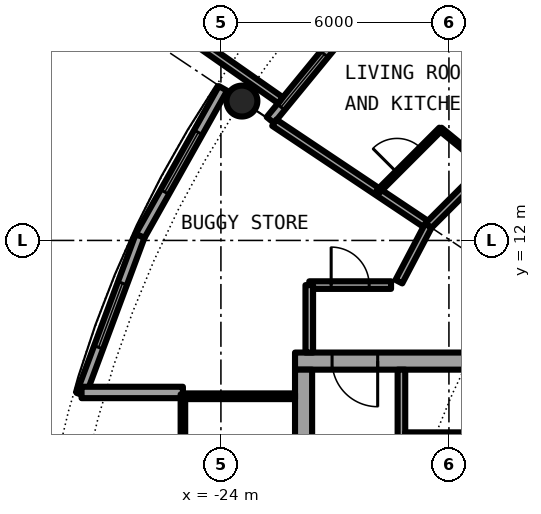
"""IFC4 building model, lengths in metres.
Left out: names, types, materials, properties, quantities, classifications, styles, units other than length and angle.
Written with IfcOpenShell. Run it as: python <this file> out.ifc"""

import sys

from ifc_helpers import new_model, si_unit, direction, frame, frame_2d, origin, origin_2d, place, context, subcontext, project, spatial, rectangle, hollow_circle, extrude, element, fill, save


model = new_model("IFC4")
c1 = context("Model", 3, precision=1e-05, world=origin(), true_north=direction((0.0, 1.0)))
c2 = subcontext(c1, "Body", "Model", "MODEL_VIEW")
j1 = project(units=[si_unit("LENGTHUNIT", "METRE"), si_unit("PLANEANGLEUNIT", "RADIAN")], contexts=[c1])
p1 = place(None, origin())
s1 = spatial("IfcSite", under=j1, at=p1, CompositionType="ELEMENT")
p2 = place(p1, origin())
s2 = spatial("IfcBuilding", under=s1, at=p2, CompositionType="ELEMENT")
p3 = place(p2, frame((0.0, 0.0, 196.3)))
s3 = spatial("IfcBuildingStorey", under=s2, at=p3, CompositionType="ELEMENT", Elevation=196.3)
p4 = place(p3, frame((-23.448, 15.667, 0.0), z_axis=(0.0, 0.0, 1.0), x_axis=(1.0, 0.0, 0.0)))
e1 = element("IfcColumn", 1, at=p4, inside=s3, PredefinedType="COLUMN", context=c2, shape_type="SweptSolid", body=[
    extrude(hollow_circle(Radius=0.406, WallThickness=0.03, at=origin_2d()), origin(), (0.0, 0.0, 1.0), 3.05),
])
p5 = place(p3, frame((-19.304, 19.304, 0.0), z_axis=(0.0, 0.0, 1.0), x_axis=(-0.634382322723, -0.773019449054, 0.0)))
e2 = element("IfcWall", 2, at=p5, inside=s3, PredefinedType="SOLIDWALL", context=c2, shape_type="SweptSolid", body=[
    extrude(rectangle(XDim=5.352, YDim=0.25, at=frame_2d((2.676, 0.0))), origin(), (0.0, 0.0, 1.0), 2.7),
])
p6 = place(p5, frame((0.841, 0.0, 0.0)))
e3 = element("IfcOpeningElement", 3, at=p6, cuts=e2, PredefinedType="OPENING", context=c2, shape_type="SweptSolid", body=[
    extrude(rectangle(XDim=1.0, YDim=2.2, at=frame_2d((0.5, 1.1))), frame((0.0, 0.135, 0.0), z_axis=(0.0, -1.0, 0.0), x_axis=(1.0, 0.0, 0.0)), (0.0, 0.0, 1.0), 0.27),
])
p7 = place(p5, frame((3.111, 0.0, 0.3)))
e4 = element("IfcOpeningElement", 4, at=p7, cuts=e2, PredefinedType="OPENING", context=c2, shape_type="SweptSolid", body=[
    extrude(rectangle(XDim=1.8, YDim=2.1, at=frame_2d((0.9, 1.05))), frame((0.0, 0.135, 0.0), z_axis=(0.0, -1.0, 0.0), x_axis=(1.0, 0.0, 0.0)), (0.0, 0.0, 1.0), 0.27),
])
p8 = place(p3, frame((-22.433, 15.688, -0.03), z_axis=(0.0, 0.0, 1.0), x_axis=(-0.819373043115, 0.573260687834, 0.0)))
e5 = element("IfcWall", 5, at=p8, inside=s3, PredefinedType="SOLIDWALL", context=c2, shape_type="SweptSolid", body=[
    extrude(rectangle(XDim=2.925, YDim=0.2, at=frame_2d((1.463, 0.0))), origin(), (0.0, 0.0, 1.0), 2.73),
])
p9 = place(p3, frame((-23.946, 16.0, 0.0), z_axis=(0.0, 0.0, 1.0), x_axis=(-0.489696356642, -0.871893042919, 0.0)))
e6 = element("IfcWall", 6, at=p9, inside=s3, PredefinedType="SOLIDWALL", context=c2, shape_type="SweptSolid", body=[
    extrude(rectangle(XDim=4.454, YDim=0.25, at=frame_2d((2.227, 0.0))), origin(), (0.0, 0.0, 1.0), 2.7),
])
p10 = place(p9, frame((1.327, 0.0, 0.3)))
e7 = element("IfcOpeningElement", 7, at=p10, cuts=e6, PredefinedType="OPENING", context=c2, shape_type="SweptSolid", body=[
    extrude(rectangle(XDim=1.8, YDim=2.1, at=frame_2d((0.9, 1.05))), frame((0.0, 0.135, 0.0), z_axis=(0.0, -1.0, 0.0), x_axis=(1.0, 0.0, 0.0)), (0.0, 0.0, 1.0), 0.27),
])
p11 = place(p3, frame((-26.127, 12.117, 0.0), z_axis=(0.0, 0.0, 1.0), x_axis=(-0.349247811493, -0.937030397675, 0.0)))
e8 = element("IfcWall", 8, at=p11, inside=s3, PredefinedType="SOLIDWALL", context=c2, shape_type="SweptSolid", body=[
    extrude(rectangle(XDim=4.452, YDim=0.25, at=frame_2d((2.226, 0.0))), origin(), (0.0, 0.0, 1.0), 2.7),
])
p12 = place(p11, frame((1.327, 0.0, 0.3)))
e9 = element("IfcOpeningElement", 9, at=p12, cuts=e8, PredefinedType="OPENING", context=c2, shape_type="SweptSolid", body=[
    extrude(rectangle(XDim=1.8, YDim=2.1, at=frame_2d((0.9, 1.05))), frame((0.0, 0.135, 0.0), z_axis=(0.0, -1.0, 0.0), x_axis=(1.0, 0.0, 0.0)), (0.0, 0.0, 1.0), 0.27),
])
p13 = place(p3, frame((-25.0, 8.0, 0.0), z_axis=(0.0, 0.0, 1.0), x_axis=(-1.0, 0.0, 0.0)))
e10 = element("IfcWall", 10, at=p13, inside=s3, PredefinedType="SOLIDWALL", context=c2, shape_type="SweptSolid", body=[
    extrude(rectangle(XDim=2.667, YDim=0.3, at=frame_2d((1.333, 0.0))), origin(), (0.0, 0.0, 1.0), 2.7),
])
p14 = place(p3, frame((-8.55, 8.825, 0.0), z_axis=(0.0, 0.0, 1.0), x_axis=(-1.0, 0.0, 0.0)))
e11 = element("IfcWall", 11, at=p14, inside=s3, PredefinedType="SHEAR", context=c2, shape_type="SweptSolid", body=[
    extrude(rectangle(XDim=13.5, YDim=0.45, at=frame_2d((6.75, 0.0))), origin(), (0.0, 0.0, 1.0), 3.05),
])
p15 = place(p14, frame((11.325, 0.0, 0.0)))
e12 = element("IfcOpeningElement", 12, at=p15, cuts=e11, PredefinedType="OPENING", context=c2, shape_type="SweptSolid", body=[
    extrude(rectangle(XDim=1.2, YDim=2.3, at=frame_2d((0.6, 1.15))), frame((0.0, 0.235, 0.0), z_axis=(0.0, -1.0, 0.0), x_axis=(1.0, 0.0, 0.0)), (0.0, 0.0, 1.0), 0.47),
])
p16 = place(p3, frame((-21.825, -8.6, 0.0), z_axis=(0.0, 0.0, 1.0), x_axis=(0.0, 1.0, 0.0)))
e13 = element("IfcWall", 13, at=p16, inside=s3, PredefinedType="SHEAR", context=c2, shape_type="SweptSolid", body=[
    extrude(rectangle(XDim=17.2, YDim=0.45, at=frame_2d((8.6, 0.0))), origin(), (0.0, 0.0, 1.0), 3.05),
])
p17 = place(p16, frame((7.7, 0.0, 0.0)))
e14 = element("IfcOpeningElement", 14, at=p17, cuts=e13, PredefinedType="OPENING", context=c2, shape_type="SweptSolid", body=[
    extrude(rectangle(XDim=1.8, YDim=2.3, at=frame_2d((0.9, 1.15))), frame((0.0, 0.235, 0.0), z_axis=(0.0, -1.0, 0.0), x_axis=(1.0, 0.0, 0.0)), (0.0, 0.0, 1.0), 0.47),
])
p18 = place(p3, frame((-19.25, 8.6, 0.0), z_axis=(0.0, 0.0, 1.0), x_axis=(0.0, -1.0, 0.0)))
e15 = element("IfcWall", 15, at=p18, inside=s3, PredefinedType="SOLIDWALL", context=c2, shape_type="SweptSolid", body=[
    extrude(rectangle(XDim=7.025, YDim=0.2, at=frame_2d((3.513, 0.0))), origin(), (0.0, 0.0, 1.0), 2.7),
])
p19 = place(p18, frame((2.35, 0.0, 0.0)))
e16 = element("IfcOpeningElement", 16, at=p19, cuts=e15, PredefinedType="OPENING", context=c2, shape_type="SweptSolid", body=[
    extrude(rectangle(XDim=1.1, YDim=2.3, at=frame_2d((0.55, 1.15))), frame((0.0, 0.11, 0.0), z_axis=(0.0, -1.0, 0.0), x_axis=(1.0, 0.0, 0.0)), (0.0, 0.0, 1.0), 0.22),
])
p20 = place(p3, frame((-15.45, 6.875, 0.0), z_axis=(0.0, 0.0, 1.0), x_axis=(-1.0, 0.0, 0.0)))
e17 = element("IfcWall", 17, at=p20, inside=s3, PredefinedType="PARTITIONING", context=c2, shape_type="SweptSolid", body=[
    extrude(rectangle(XDim=3.7, YDim=0.15, at=frame_2d((1.85, 0.0))), origin(), (0.0, 0.0, 1.0), 2.7),
])
p21 = place(p20, frame((1.4, 0.0, 0.0)))
e18 = element("IfcOpeningElement", 18, at=p21, cuts=e17, PredefinedType="OPENING", context=c2, shape_type="SweptSolid", body=[
    extrude(rectangle(XDim=0.9, YDim=2.3, at=frame_2d((0.45, 1.15))), frame((0.0, 0.085, 0.0), z_axis=(0.0, -1.0, 0.0), x_axis=(1.0, 0.0, 0.0)), (0.0, 0.0, 1.0), 0.17),
])
p22 = place(p3, frame((-22.05, 7.9, 0.0), z_axis=(0.0, 0.0, 1.0), x_axis=(-1.0, 0.0, 0.0)))
e19 = element("IfcWall", 19, at=p22, inside=s3, PredefinedType="PARTITIONING", context=c2, shape_type="SweptSolid", body=[
    extrude(rectangle(XDim=2.89, YDim=0.15, at=frame_2d((1.445, 0.0))), origin(), (0.0, 0.0, 1.0), 2.7),
])
p23 = place(p3, frame((-25.0, 7.95, 0.0), z_axis=(0.0, 0.0, 1.0), x_axis=(0.0, -1.0, 0.0)))
e20 = element("IfcWall", 20, at=p23, inside=s3, PredefinedType="PARTITIONING", context=c2, shape_type="SweptSolid", body=[
    extrude(rectangle(XDim=15.9, YDim=0.12, at=frame_2d((7.95, 0.0))), origin(), (0.0, 0.0, 1.0), 2.7),
])
p24 = place(p23, frame((0.95, 0.0, 0.1)))
e21 = element("IfcOpeningElement", 21, at=p24, cuts=e20, PredefinedType="OPENING", context=c2, shape_type="SweptSolid", body=[
    extrude(rectangle(XDim=14.0, YDim=2.35, at=frame_2d((7.0, 1.175))), frame((0.0, 0.07, 0.0), z_axis=(0.0, -1.0, 0.0), x_axis=(1.0, 0.0, 0.0)), (0.0, 0.0, 1.0), 0.14),
])
p25 = place(p3, frame((-18.224, 14.927, 0.0), z_axis=(0.0, 0.0, 1.0), x_axis=(0.773446828454, -0.633861186344, 0.0)))
e22 = element("IfcWall", 22, at=p25, inside=s3, PredefinedType="PARTITIONING", context=c2, shape_type="SweptSolid", body=[
    extrude(rectangle(XDim=1.578, YDim=0.1, at=frame_2d((0.789, 0.0))), origin(), (0.0, 0.0, 1.0), 2.7),
])
p26 = place(p3, frame((-22.595, 15.098, 0.0), z_axis=(0.0, 0.0, 1.0), x_axis=(0.831387096605, -0.55569370664, 0.0)))
e23 = element("IfcWall", 23, at=p26, inside=s3, PredefinedType="PARTITIONING", context=c2, shape_type="SweptSolid", body=[
    extrude(rectangle(XDim=4.875, YDim=0.2, at=frame_2d((2.438, 0.0))), origin(), (0.0, 0.0, 1.0), 2.7),
])
p27 = place(p3, frame((-19.216, 19.216, 0.0), z_axis=(0.0, 0.0, 1.0), x_axis=(0.707106781187, -0.707106781187, 0.0)))
e24 = element("IfcWall", 24, at=p27, inside=s3, PredefinedType="PARTITIONING", context=c2, shape_type="SweptSolid", body=[
    extrude(rectangle(XDim=3.735, YDim=0.1, at=frame_2d((1.868, 0.0))), origin(), (0.0, 0.0, 1.0), 2.7),
])
p28 = place(p27, frame((1.417, 0.0, 0.0)))
e25 = element("IfcOpeningElement", 25, at=p28, cuts=e24, PredefinedType="OPENING", context=c2, shape_type="SweptSolid", body=[
    extrude(rectangle(XDim=0.9, YDim=2.3, at=frame_2d((0.45, 1.15))), frame((0.0, 0.06, 0.0), z_axis=(0.0, -1.0, 0.0), x_axis=(1.0, 0.0, 0.0)), (0.0, 0.0, 1.0), 0.12),
])
p29 = place(p3, frame((-21.675, 10.825, 0.0), z_axis=(0.0, 0.0, 1.0), x_axis=(1.0, 0.0, 0.0)))
e26 = element("IfcWall", 26, at=p29, inside=s3, PredefinedType="PARTITIONING", context=c2, shape_type="SweptSolid", body=[
    extrude(rectangle(XDim=2.152, YDim=0.2, at=frame_2d((1.076, 0.0))), origin(), (0.0, 0.0, 1.0), 2.7),
])
p30 = place(p29, frame((0.576, 0.0, 0.0)))
e27 = element("IfcOpeningElement", 27, at=p30, cuts=e26, PredefinedType="OPENING", context=c2, shape_type="SweptSolid", body=[
    extrude(rectangle(XDim=1.0, YDim=2.3, at=frame_2d((0.5, 1.15))), frame((0.0, 0.11, 0.0), z_axis=(0.0, -1.0, 0.0), x_axis=(1.0, 0.0, 0.0)), (0.0, 0.0, 1.0), 0.22),
])
p31 = place(p3, frame((-21.675, 9.05, 0.0), z_axis=(0.0, 0.0, 1.0), x_axis=(0.0, 1.0, 0.0)))
e28 = element("IfcWall", 28, at=p31, inside=s3, PredefinedType="PARTITIONING", context=c2, shape_type="SweptSolid", body=[
    extrude(rectangle(XDim=1.775, YDim=0.2, at=frame_2d((0.887, 0.0))), origin(), (0.0, 0.0, 1.0), 2.7),
])
p32 = place(p3, frame((-18.542, 12.389, 0.0), z_axis=(0.0, 0.0, 1.0), x_axis=(0.707106781187, 0.707106781187, 0.0)))
e29 = element("IfcWall", 29, at=p32, inside=s3, PredefinedType="PARTITIONING", context=c2, shape_type="SweptSolid", body=[
    extrude(rectangle(XDim=8.702, YDim=0.2, at=frame_2d((4.351, 0.0))), origin(), (0.0, 0.0, 1.0), 2.7),
])
p33 = place(p32, frame((4.938, 0.0, 0.0)))
e30 = element("IfcOpeningElement", 30, at=p33, cuts=e29, PredefinedType="OPENING", context=c2, shape_type="SweptSolid", body=[
    extrude(rectangle(XDim=1.0, YDim=2.3, at=frame_2d((0.5, 1.15))), frame((0.0, 0.11, 0.0), z_axis=(0.0, -1.0, 0.0), x_axis=(1.0, 0.0, 0.0)), (0.0, 0.0, 1.0), 0.22),
])
p34 = place(p3, frame((-19.317, 10.915, 0.0), z_axis=(0.0, 0.0, 1.0), x_axis=(0.465359652486, 0.885121683068, 0.0)))
e31 = element("IfcWall", 31, at=p34, inside=s3, PredefinedType="PARTITIONING", context=c2, shape_type="SweptSolid", body=[
    extrude(rectangle(XDim=1.665, YDim=0.2, at=frame_2d((0.833, 0.0))), origin(), (0.0, 0.0, 1.0), 2.7),
])
p35 = place(p3, frame((-19.867, 13.283, 0.0), z_axis=(0.0, 0.0, 1.0), x_axis=(0.707106781187, 0.707106781187, 0.0)))
e32 = element("IfcWall", 32, at=p35, inside=s3, PredefinedType="PARTITIONING", context=c2, shape_type="SweptSolid", body=[
    extrude(rectangle(XDim=2.332, YDim=0.1, at=frame_2d((1.166, 0.0))), origin(), (0.0, 0.0, 1.0), 2.7),
])
p36 = place(p35, frame((0.709, 0.0, 0.0)))
e33 = element("IfcOpeningElement", 33, at=p36, cuts=e32, PredefinedType="OPENING", context=c2, shape_type="SweptSolid", body=[
    extrude(rectangle(XDim=0.9, YDim=2.3, at=frame_2d((0.45, 1.15))), frame((0.0, 0.06, 0.0), z_axis=(0.0, -1.0, 0.0), x_axis=(1.0, 0.0, 0.0)), (0.0, 0.0, 1.0), 0.12),
])
p37 = place(p7, origin())
e34 = element("IfcWindow", 34, at=p37, inside=s3, PartitioningType="SINGLE_PANEL", PredefinedType="WINDOW", context=c2, shape_type="SweptSolid", body=[
    extrude(rectangle(XDim=1.8, YDim=2.1, at=frame_2d((0.9, 1.05))), frame((0.0, 0.03, 0.0), z_axis=(0.0, -1.0, 0.0), x_axis=(1.0, 0.0, 0.0)), (0.0, 0.0, 1.0), 0.06),
])
fill(e4, e34)
p38 = place(p10, origin())
e35 = element("IfcWindow", 35, at=p38, inside=s3, PartitioningType="SINGLE_PANEL", PredefinedType="WINDOW", context=c2, shape_type="SweptSolid", body=[
    extrude(rectangle(XDim=1.8, YDim=2.1, at=frame_2d((0.9, 1.05))), frame((0.0, 0.03, 0.0), z_axis=(0.0, -1.0, 0.0), x_axis=(1.0, 0.0, 0.0)), (0.0, 0.0, 1.0), 0.06),
])
fill(e7, e35)
p39 = place(p12, origin())
e36 = element("IfcWindow", 36, at=p39, inside=s3, PartitioningType="SINGLE_PANEL", PredefinedType="WINDOW", context=c2, shape_type="SweptSolid", body=[
    extrude(rectangle(XDim=1.8, YDim=2.1, at=frame_2d((0.9, 1.05))), frame((0.0, 0.03, 0.0), z_axis=(0.0, -1.0, 0.0), x_axis=(1.0, 0.0, 0.0)), (0.0, 0.0, 1.0), 0.06),
])
fill(e9, e36)
p40 = place(p21, origin())
e37 = element("IfcDoor", 37, at=p40, inside=s3, OperationType="SINGLE_SWING_LEFT", PredefinedType="DOOR", context=c2, shape_type="SweptSolid", body=[
    extrude(rectangle(XDim=0.9, YDim=2.3, at=frame_2d((0.45, 1.15))), frame((0.0, 0.025, 0.0), z_axis=(0.0, -1.0, 0.0), x_axis=(1.0, 0.0, 0.0)), (0.0, 0.0, 1.0), 0.05),
])
fill(e18, e37)
p41 = place(p15, origin())
e38 = element("IfcDoor", 38, at=p41, inside=s3, OperationType="SINGLE_SWING_LEFT", PredefinedType="DOOR", context=c2, shape_type="SweptSolid", body=[
    extrude(rectangle(XDim=1.2, YDim=2.3, at=frame_2d((0.6, 1.15))), frame((0.0, 0.025, 0.0), z_axis=(0.0, -1.0, 0.0), x_axis=(1.0, 0.0, 0.0)), (0.0, 0.0, 1.0), 0.05),
])
fill(e12, e38)
p42 = place(p24, origin())
e39 = element("IfcWindow", 39, at=p42, inside=s3, PartitioningType="SINGLE_PANEL", PredefinedType="WINDOW", context=c2, shape_type="SweptSolid", body=[
    extrude(rectangle(XDim=14.0, YDim=2.35, at=frame_2d((7.0, 1.175))), frame((0.0, 0.03, 0.0), z_axis=(0.0, -1.0, 0.0), x_axis=(1.0, 0.0, 0.0)), (0.0, 0.0, 1.0), 0.06),
])
fill(e21, e39)
p43 = place(p36, origin())
e40 = element("IfcDoor", 40, at=p43, inside=s3, OperationType="SINGLE_SWING_LEFT", PredefinedType="DOOR", context=c2, shape_type="SweptSolid", body=[
    extrude(rectangle(XDim=0.9, YDim=2.3, at=frame_2d((0.45, 1.15))), frame((0.0, 0.025, 0.0), z_axis=(0.0, -1.0, 0.0), x_axis=(1.0, 0.0, 0.0)), (0.0, 0.0, 1.0), 0.05),
])
fill(e33, e40)
p44 = place(p30, origin())
e41 = element("IfcDoor", 41, at=p44, inside=s3, OperationType="SINGLE_SWING_LEFT", PredefinedType="DOOR", context=c2, shape_type="SweptSolid", body=[
    extrude(rectangle(XDim=1.0, YDim=2.3, at=frame_2d((0.5, 1.15))), frame((0.0, 0.025, 0.0), z_axis=(0.0, -1.0, 0.0), x_axis=(1.0, 0.0, 0.0)), (0.0, 0.0, 1.0), 0.05),
])
fill(e27, e41)
save(model, sys.argv[1])
